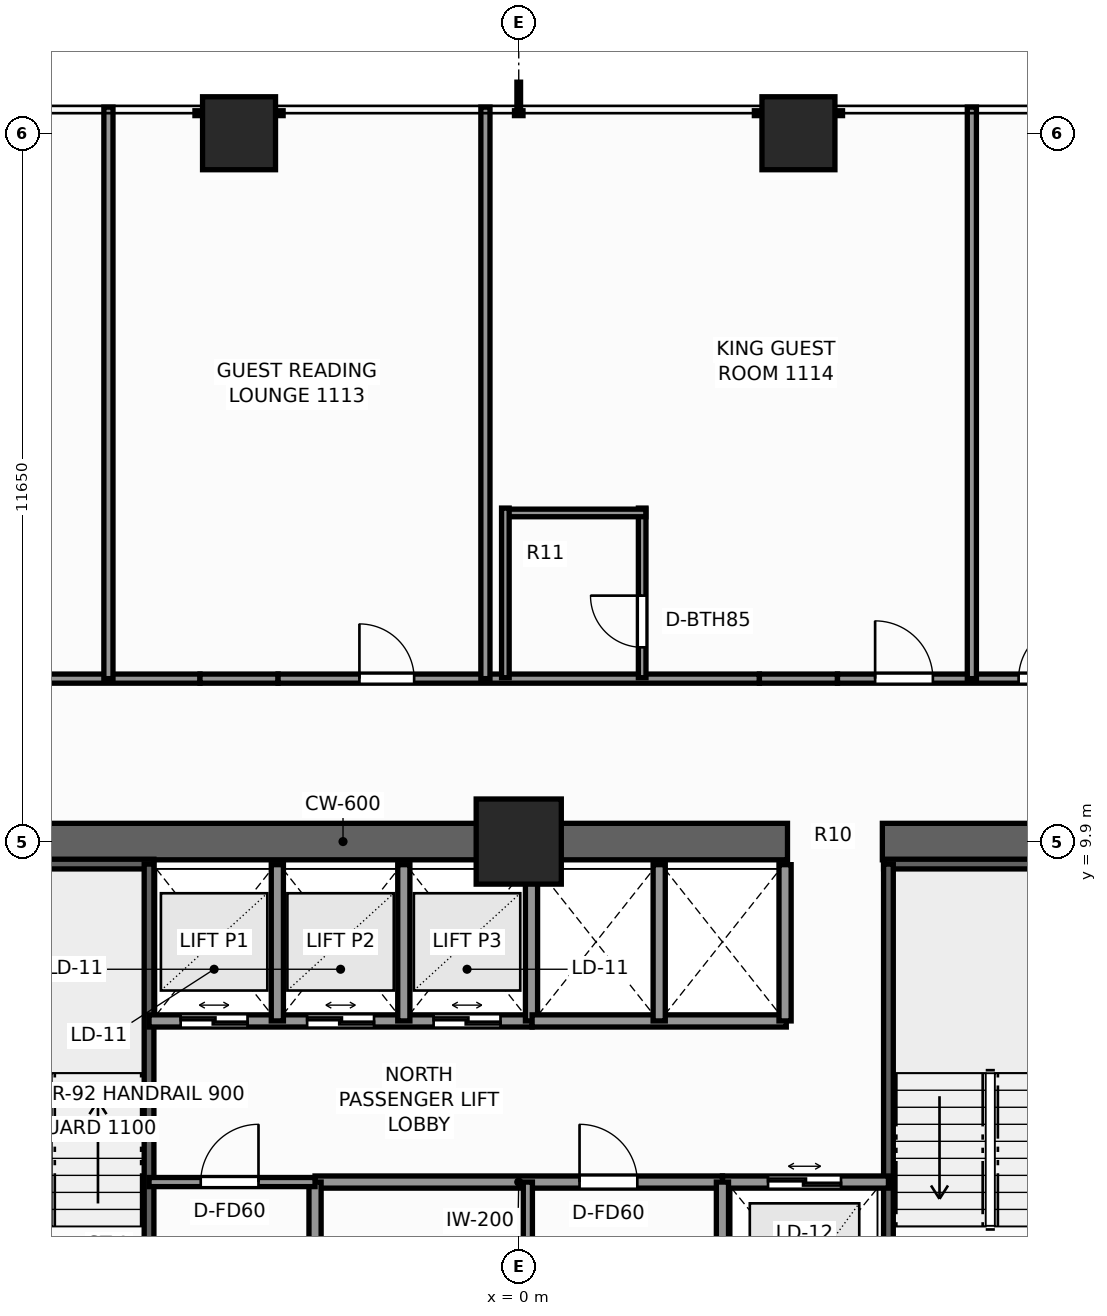
"""IFC4 building model, lengths in metres.
Left out: names, types, materials, properties, quantities, classifications, styles, units other than length and angle.
Written with IfcOpenShell. Run it as: python <this file> out.ifc"""

import sys

from ifc_helpers import new_model, si_unit, direction, frame, frame_2d, origin, origin_2d, place, context, subcontext, project, spatial, rectangle, extrude, element, fill, save


model = new_model("IFC4")
c1 = context("Model", 3, precision=1e-05, world=origin(), true_north=direction((0.0, 1.0)))
c2 = subcontext(c1, "Body", "Model", "MODEL_VIEW")
j1 = project(units=[si_unit("LENGTHUNIT", "METRE"), si_unit("PLANEANGLEUNIT", "RADIAN")], contexts=[c1])
p1 = place(None, origin())
s1 = spatial("IfcSite", under=j1, at=p1, CompositionType="ELEMENT")
p2 = place(p1, origin())
s2 = spatial("IfcBuilding", under=s1, at=p2, CompositionType="ELEMENT")
p3 = place(p2, frame((0.0, 0.0, 40.3)))
s3 = spatial("IfcBuildingStorey", under=s2, at=p3, CompositionType="ELEMENT", Elevation=40.3)
p4 = place(p3, frame((-10.2, 9.9, 0.0), z_axis=(0.0, 0.0, 1.0), x_axis=(1.0, 0.0, 0.0)))
e1 = element("IfcWall", 1, at=p4, inside=s3, PredefinedType="SHEAR", context=c2, shape_type="SweptSolid", body=[
    extrude(rectangle(XDim=14.62, YDim=0.6, at=frame_2d((7.31, 0.0))), origin(), (0.0, 0.0, 1.0), 3.3),
])
p5 = place(p3, frame((5.98, 9.9, 0.0), z_axis=(0.0, 0.0, 1.0), x_axis=(1.0, 0.0, 0.0)))
e2 = element("IfcWall", 2, at=p5, inside=s3, PredefinedType="SHEAR", context=c2, shape_type="SweptSolid", body=[
    extrude(rectangle(XDim=4.22, YDim=0.6, at=frame_2d((2.11, 0.0))), origin(), (0.0, 0.0, 1.0), 3.3),
])
p6 = place(p3, frame((0.0, 9.9, 0.0), z_axis=(0.0, 0.0, 1.0), x_axis=(1.0, 0.0, 0.0)))
e3 = element("IfcColumn", 3, at=p6, inside=s3, PredefinedType="COLUMN", context=c2, shape_type="SweptSolid", body=[
    extrude(rectangle(XDim=1.4, YDim=1.4, at=origin_2d()), origin(), (0.0, 0.0, 1.0), 3.3),
])
for number, where, z_axis, x_axis in (
    (4, (-4.6, 21.55, 0.0), (0.0, 0.0, 1.0), (1.0, 0.0, 0.0)),
    (5, (4.6, 21.55, 0.0), (0.0, 0.0, 1.0), (1.0, 0.0, 0.0)),
):
    element("IfcColumn", number, at=place(p3, frame(where, z_axis=z_axis, x_axis=x_axis)), inside=s3, PredefinedType="COLUMN", context=c2, shape_type="SweptSolid", body=[
        extrude(rectangle(XDim=1.2, YDim=1.2, at=origin_2d()), origin(), (0.0, 0.0, 1.0), 3.3),
    ])
p7 = place(p3, frame((-9.52, 9.53, 0.0), z_axis=(0.0, 0.0, 1.0), x_axis=(1.0, 0.0, 0.0)))
e6 = element("IfcWall", 6, at=p7, inside=s3, PredefinedType="SHEAR", context=c2, shape_type="SweptSolid", body=[
    extrude(rectangle(XDim=3.52, YDim=0.16, at=frame_2d((1.76, 0.0))), origin(), (0.0, 0.0, 1.0), 3.3),
])
p8 = place(p3, frame((-6.08, 1.97, 0.0), z_axis=(0.0, 0.0, 1.0), x_axis=(0.0, 1.0, 0.0)))
e7 = element("IfcWall", 7, at=p8, inside=s3, PredefinedType="SHEAR", context=c2, shape_type="SweptSolid", body=[
    extrude(rectangle(XDim=7.56, YDim=0.16, at=frame_2d((3.78, 0.0))), origin(), (0.0, 0.0, 1.0), 3.3),
])
p9 = place(p3, frame((6.0, 9.53, 0.0), z_axis=(0.0, 0.0, 1.0), x_axis=(1.0, 0.0, 0.0)))
e8 = element("IfcWall", 8, at=p9, inside=s3, PredefinedType="SHEAR", context=c2, shape_type="SweptSolid", body=[
    extrude(rectangle(XDim=3.52, YDim=0.16, at=frame_2d((1.76, 0.0))), origin(), (0.0, 0.0, 1.0), 3.3),
])
p10 = place(p3, frame((6.08, 1.97, 0.0), z_axis=(0.0, 0.0, 1.0), x_axis=(0.0, 1.0, 0.0)))
e9 = element("IfcWall", 9, at=p10, inside=s3, PredefinedType="SHEAR", context=c2, shape_type="SweptSolid", body=[
    extrude(rectangle(XDim=7.56, YDim=0.16, at=frame_2d((3.78, 0.0))), origin(), (0.0, 0.0, 1.0), 3.3),
])
p11 = place(p3, frame((3.35, 4.3, 0.0), z_axis=(0.0, 0.0, 1.0), x_axis=(1.0, 0.0, 0.0)))
e10 = element("IfcWall", 10, at=p11, inside=s3, PredefinedType="SOLIDWALL", context=c2, shape_type="SweptSolid", body=[
    extrude(rectangle(XDim=2.73, YDim=0.2, at=frame_2d((1.365, 0.0))), origin(), (0.0, 0.0, 1.0), 3.06),
])
p12 = place(p11, frame((0.75, 0.0, 0.0)))
e11 = element("IfcOpeningElement", 11, at=p12, cuts=e10, PredefinedType="OPENING", context=c2, shape_type="SweptSolid", body=[
    extrude(rectangle(XDim=1.2, YDim=2.25, at=frame_2d((0.6, 1.125))), frame((0.0, 0.11, 0.0), z_axis=(0.0, -1.0, 0.0), x_axis=(1.0, 0.0, 0.0)), (0.0, 0.0, 1.0), 0.22),
])
p13 = place(p3, frame((-6.08, 6.95, 0.0), z_axis=(0.0, 0.0, 1.0), x_axis=(1.0, 0.0, 0.0)))
e12 = element("IfcWall", 12, at=p13, inside=s3, PredefinedType="SOLIDWALL", context=c2, shape_type="SweptSolid", body=[
    extrude(rectangle(XDim=6.3, YDim=0.2, at=frame_2d((3.15, 0.0))), origin(), (0.0, 0.0, 1.0), 3.06),
])
p14 = place(p13, frame((0.52, 0.0, 0.0)))
e13 = element("IfcOpeningElement", 13, at=p14, cuts=e12, PredefinedType="OPENING", context=c2, shape_type="SweptSolid", body=[
    extrude(rectangle(XDim=1.1, YDim=2.2, at=frame_2d((0.55, 1.1))), frame((0.0, 0.11, 0.0), z_axis=(0.0, -1.0, 0.0), x_axis=(1.0, 0.0, 0.0)), (0.0, 0.0, 1.0), 0.22),
])
p15 = place(p13, frame((2.6, 0.0, 0.0)))
e14 = element("IfcOpeningElement", 14, at=p15, cuts=e12, PredefinedType="OPENING", context=c2, shape_type="SweptSolid", body=[
    extrude(rectangle(XDim=1.1, YDim=2.2, at=frame_2d((0.55, 1.1))), frame((0.0, 0.11, 0.0), z_axis=(0.0, -1.0, 0.0), x_axis=(1.0, 0.0, 0.0)), (0.0, 0.0, 1.0), 0.22),
])
p16 = place(p13, frame((4.68, 0.0, 0.0)))
e15 = element("IfcOpeningElement", 15, at=p16, cuts=e12, PredefinedType="OPENING", context=c2, shape_type="SweptSolid", body=[
    extrude(rectangle(XDim=1.1, YDim=2.2, at=frame_2d((0.55, 1.1))), frame((0.0, 0.11, 0.0), z_axis=(0.0, -1.0, 0.0), x_axis=(1.0, 0.0, 0.0)), (0.0, 0.0, 1.0), 0.22),
])
for number, where, z_axis, x_axis in (
    (16, (-3.97, 6.95, 0.0), (0.0, 0.0, 1.0), (0.0, 1.0, 0.0)),
    (17, (-1.89, 6.95, 0.0), (0.0, 0.0, 1.0), (0.0, 1.0, 0.0)),
    (18, (0.21, 6.95, 0.0), (0.0, 0.0, 1.0), (0.0, 1.0, 0.0)),
):
    element("IfcWall", number, at=place(p3, frame(where, z_axis=z_axis, x_axis=x_axis)), inside=s3, PredefinedType="SOLIDWALL", context=c2, shape_type="SweptSolid", body=[
        extrude(rectangle(XDim=2.57, YDim=0.2, at=frame_2d((1.285, 0.0))), origin(), (0.0, 0.0, 1.0), 3.06),
    ])
p17 = place(p3, frame((0.22, 6.95, 0.0), z_axis=(0.0, 0.0, 1.0), x_axis=(1.0, 0.0, 0.0)))
e19 = element("IfcWall", 19, at=p17, inside=s3, PredefinedType="SOLIDWALL", context=c2, shape_type="SweptSolid", body=[
    extrude(rectangle(XDim=4.18, YDim=0.2, at=frame_2d((2.09, 0.0))), origin(), (0.0, 0.0, 1.0), 3.06),
])
for number, where, z_axis, x_axis in (
    (20, (4.38, 6.95, 0.0), (0.0, 0.0, 1.0), (0.0, 1.0, 0.0)),
    (21, (2.31, 6.95, 0.0), (0.0, 0.0, 1.0), (0.0, 1.0, 0.0)),
):
    element("IfcWall", number, at=place(p3, frame(where, z_axis=z_axis, x_axis=x_axis)), inside=s3, PredefinedType="SOLIDWALL", context=c2, shape_type="SweptSolid", body=[
        extrude(rectangle(XDim=2.57, YDim=0.2, at=frame_2d((1.285, 0.0))), origin(), (0.0, 0.0, 1.0), 3.06),
    ])
p18 = place(p3, frame((-3.35, 4.3, 0.0), z_axis=(0.0, 0.0, 1.0), x_axis=(1.0, 0.0, 0.0)))
e22 = element("IfcWall", 22, at=p18, inside=s3, PredefinedType="SOLIDWALL", context=c2, shape_type="SweptSolid", body=[
    extrude(rectangle(XDim=6.7, YDim=0.2, at=frame_2d((3.35, 0.0))), origin(), (0.0, 0.0, 1.0), 3.06),
])
p19 = place(p18, frame((4.35, 0.0, 0.0)))
e23 = element("IfcOpeningElement", 23, at=p19, cuts=e22, PredefinedType="OPENING", context=c2, shape_type="SweptSolid", body=[
    extrude(rectangle(XDim=0.95, YDim=2.06, at=frame_2d((0.475, 1.03))), frame((0.0, 0.11, 0.0), z_axis=(0.0, -1.0, 0.0), x_axis=(1.0, 0.0, 0.0)), (0.0, 0.0, 1.0), 0.22),
])
for number, where, z_axis, x_axis in (
    (24, (-3.35, 1.1, 0.0), (0.0, 0.0, 1.0), (0.0, 1.0, 0.0)),
    (25, (3.35, 1.1, 0.0), (0.0, 0.0, 1.0), (0.0, 1.0, 0.0)),
):
    element("IfcWall", number, at=place(p3, frame(where, z_axis=z_axis, x_axis=x_axis)), inside=s3, PredefinedType="SOLIDWALL", context=c2, shape_type="SweptSolid", body=[
        extrude(rectangle(XDim=3.2, YDim=0.2, at=frame_2d((1.6, 0.0))), origin(), (0.0, 0.0, 1.0), 3.06),
    ])
p20 = place(p3, frame((0.15, -1.7, 0.0), z_axis=(0.0, 0.0, 1.0), x_axis=(0.0, 1.0, 0.0)))
e26 = element("IfcWall", 26, at=p20, inside=s3, PredefinedType="PARTITIONING", context=c2, shape_type="SweptSolid", body=[
    extrude(rectangle(XDim=6.0, YDim=0.15, at=frame_2d((3.0, 0.0))), origin(), (0.0, 0.0, 1.0), 3.06),
])
p21 = place(p20, frame((3.6, 0.0, 0.0)))
e27 = element("IfcOpeningElement", 27, at=p21, cuts=e26, PredefinedType="OPENING", context=c2, shape_type="SweptSolid", body=[
    extrude(rectangle(XDim=0.85, YDim=2.03, at=frame_2d((0.425, 1.015))), frame((0.0, 0.085, 0.0), z_axis=(0.0, -1.0, 0.0), x_axis=(1.0, 0.0, 0.0)), (0.0, 0.0, 1.0), 0.17),
])
p22 = place(p3, frame((-6.08, 4.3, 0.0), z_axis=(0.0, 0.0, 1.0), x_axis=(1.0, 0.0, 0.0)))
e28 = element("IfcWall", 28, at=p22, inside=s3, PredefinedType="PARTITIONING", context=c2, shape_type="SweptSolid", body=[
    extrude(rectangle(XDim=2.73, YDim=0.15, at=frame_2d((1.365, 0.0))), origin(), (0.0, 0.0, 1.0), 3.06),
])
p23 = place(p22, frame((0.85, 0.0, 0.0)))
e29 = element("IfcOpeningElement", 29, at=p23, cuts=e28, PredefinedType="OPENING", context=c2, shape_type="SweptSolid", body=[
    extrude(rectangle(XDim=0.95, YDim=2.06, at=frame_2d((0.475, 1.03))), frame((0.0, 0.085, 0.0), z_axis=(0.0, -1.0, 0.0), x_axis=(1.0, 0.0, 0.0)), (0.0, 0.0, 1.0), 0.17),
])
p24 = place(p3, frame((-10.216, 12.58, 0.0), z_axis=(0.0, 0.0, 1.0), x_axis=(1.0, 0.0, 0.0)))
e30 = element("IfcWall", 30, at=p24, inside=s3, PredefinedType="PARTITIONING", context=c2, shape_type="SweptSolid", body=[
    extrude(rectangle(XDim=4.974, YDim=0.15, at=frame_2d((2.487, 0.0))), origin(), (0.0, 0.0, 1.0), 3.06),
])
p25 = place(p24, frame((1.535, 0.0, 0.0)))
e31 = element("IfcOpeningElement", 31, at=p25, cuts=e30, PredefinedType="OPENING", context=c2, shape_type="SweptSolid", body=[
    extrude(rectangle(XDim=0.9, YDim=2.06, at=frame_2d((0.45, 1.03))), frame((0.0, 0.085, 0.0), z_axis=(0.0, -1.0, 0.0), x_axis=(1.0, 0.0, 0.0)), (0.0, 0.0, 1.0), 0.17),
])
p26 = place(p3, frame((-5.242, 12.58, 0.0), z_axis=(0.0, 0.0, 1.0), x_axis=(1.0, 0.0, 0.0)))
e32 = element("IfcWall", 32, at=p26, inside=s3, PredefinedType="PARTITIONING", context=c2, shape_type="SweptSolid", body=[
    extrude(rectangle(XDim=1.284, YDim=0.15, at=frame_2d((0.642, 0.0))), origin(), (0.0, 0.0, 1.0), 1.245),
])
p27 = place(p3, frame((-3.958, 12.58, 0.0), z_axis=(0.0, 0.0, 1.0), x_axis=(1.0, 0.0, 0.0)))
e33 = element("IfcWall", 33, at=p27, inside=s3, PredefinedType="PARTITIONING", context=c2, shape_type="SweptSolid", body=[
    extrude(rectangle(XDim=7.916, YDim=0.15, at=frame_2d((3.958, 0.0))), origin(), (0.0, 0.0, 1.0), 2.349),
])
p28 = place(p27, frame((1.338, 0.0, 0.0)))
e34 = element("IfcOpeningElement", 34, at=p28, cuts=e33, PredefinedType="OPENING", context=c2, shape_type="SweptSolid", body=[
    extrude(rectangle(XDim=0.9, YDim=2.06, at=frame_2d((0.45, 1.03))), frame((0.0, 0.085, 0.0), z_axis=(0.0, -1.0, 0.0), x_axis=(1.0, 0.0, 0.0)), (0.0, 0.0, 1.0), 0.17),
])
p29 = place(p3, frame((3.958, 12.58, 0.0), z_axis=(0.0, 0.0, 1.0), x_axis=(1.0, 0.0, 0.0)))
e35 = element("IfcWall", 35, at=p29, inside=s3, PredefinedType="PARTITIONING", context=c2, shape_type="SweptSolid", body=[
    extrude(rectangle(XDim=1.284, YDim=0.15, at=frame_2d((0.642, 0.0))), origin(), (0.0, 0.0, 1.0), 1.245),
])
p30 = place(p3, frame((5.242, 12.58, 0.0), z_axis=(0.0, 0.0, 1.0), x_axis=(1.0, 0.0, 0.0)))
e36 = element("IfcWall", 36, at=p30, inside=s3, PredefinedType="PARTITIONING", context=c2, shape_type="SweptSolid", body=[
    extrude(rectangle(XDim=4.974, YDim=0.15, at=frame_2d((2.487, 0.0))), origin(), (0.0, 0.0, 1.0), 3.06),
])
p31 = place(p30, frame((0.619, 0.0, 0.0)))
e37 = element("IfcOpeningElement", 37, at=p31, cuts=e36, PredefinedType="OPENING", context=c2, shape_type="SweptSolid", body=[
    extrude(rectangle(XDim=0.95, YDim=2.06, at=frame_2d((0.475, 1.03))), frame((0.0, 0.085, 0.0), z_axis=(0.0, -1.0, 0.0), x_axis=(1.0, 0.0, 0.0)), (0.0, 0.0, 1.0), 0.17),
])
p32 = place(p30, frame((2.979, 0.0, 0.0)))
e38 = element("IfcOpeningElement", 38, at=p32, cuts=e36, PredefinedType="OPENING", context=c2, shape_type="SweptSolid", body=[
    extrude(rectangle(XDim=0.9, YDim=2.06, at=frame_2d((0.45, 1.03))), frame((0.0, 0.085, 0.0), z_axis=(0.0, -1.0, 0.0), x_axis=(1.0, 0.0, 0.0)), (0.0, 0.0, 1.0), 0.17),
])
for number, where, z_axis, x_axis in (
    (39, (-6.748, 12.58, 0.0), (0.0, 0.0, 1.0), (0.0, 1.0, 0.0)),
    (40, (-0.548, 12.58, 0.0), (0.0, 0.0, 1.0), (0.0, 1.0, 0.0)),
    (41, (7.452, 12.58, 0.0), (0.0, 0.0, 1.0), (0.0, 1.0, 0.0)),
):
    element("IfcWall", number, at=place(p3, frame(where, z_axis=z_axis, x_axis=x_axis)), inside=s3, PredefinedType="PARTITIONING", context=c2, shape_type="SweptSolid", body=[
        extrude(rectangle(XDim=9.4, YDim=0.15, at=frame_2d((4.7, 0.0))), origin(), (0.0, 0.0, 1.0), 2.429),
    ])
p33 = place(p3, frame((2.03, 12.595, 0.0), z_axis=(0.0, 0.0, 1.0), x_axis=(0.0, 1.0, 0.0)))
e42 = element("IfcWall", 42, at=p33, inside=s3, PredefinedType="PARTITIONING", context=c2, shape_type="SweptSolid", body=[
    extrude(rectangle(XDim=2.79, YDim=0.125, at=frame_2d((1.395, 0.0))), origin(), (0.0, 0.0, 1.0), 3.06),
])
p34 = place(p33, frame((0.5, 0.0, 0.0)))
e43 = element("IfcOpeningElement", 43, at=p34, cuts=e42, PredefinedType="OPENING", context=c2, shape_type="SweptSolid", body=[
    extrude(rectangle(XDim=0.85, YDim=2.03, at=frame_2d((0.425, 1.015))), frame((0.0, 0.073, 0.0), z_axis=(0.0, -1.0, 0.0), x_axis=(1.0, 0.0, 0.0)), (0.0, 0.0, 1.0), 0.145),
])
p35 = place(p3, frame((-0.28, 15.305, 0.0), z_axis=(0.0, 0.0, 1.0), x_axis=(1.0, 0.0, 0.0)))
e44 = element("IfcWall", 44, at=p35, inside=s3, PredefinedType="PARTITIONING", context=c2, shape_type="SweptSolid", body=[
    extrude(rectangle(XDim=2.37, YDim=0.125, at=frame_2d((1.185, 0.0))), origin(), (0.0, 0.0, 1.0), 2.585),
])
p36 = place(p3, frame((-0.22, 12.595, 0.0), z_axis=(0.0, 0.0, 1.0), x_axis=(0.0, 1.0, 0.0)))
e45 = element("IfcWall", 45, at=p36, inside=s3, PredefinedType="PARTITIONING", context=c2, shape_type="SweptSolid", body=[
    extrude(rectangle(XDim=2.79, YDim=0.125, at=frame_2d((1.395, 0.0))), origin(), (0.0, 0.0, 1.0), 3.06),
])
p37 = place(p12, origin())
e46 = element("IfcDoor", 46, at=p37, inside=s3, OperationType="DOUBLE_DOOR_SLIDING", PredefinedType="DOOR", context=c2, shape_type="SweptSolid", body=[
    extrude(rectangle(XDim=1.2, YDim=2.25, at=frame_2d((0.6, 1.125))), frame((0.0, 0.025, 0.0), z_axis=(0.0, -1.0, 0.0), x_axis=(1.0, 0.0, 0.0)), (0.0, 0.0, 1.0), 0.05),
])
fill(e11, e46)
p38 = place(p14, origin())
e47 = element("IfcDoor", 47, at=p38, inside=s3, OperationType="DOUBLE_DOOR_SLIDING", PredefinedType="DOOR", context=c2, shape_type="SweptSolid", body=[
    extrude(rectangle(XDim=1.1, YDim=2.2, at=frame_2d((0.55, 1.1))), frame((0.0, 0.025, 0.0), z_axis=(0.0, -1.0, 0.0), x_axis=(1.0, 0.0, 0.0)), (0.0, 0.0, 1.0), 0.05),
])
fill(e13, e47)
p39 = place(p15, origin())
e48 = element("IfcDoor", 48, at=p39, inside=s3, OperationType="DOUBLE_DOOR_SLIDING", PredefinedType="DOOR", context=c2, shape_type="SweptSolid", body=[
    extrude(rectangle(XDim=1.1, YDim=2.2, at=frame_2d((0.55, 1.1))), frame((0.0, 0.025, 0.0), z_axis=(0.0, -1.0, 0.0), x_axis=(1.0, 0.0, 0.0)), (0.0, 0.0, 1.0), 0.05),
])
fill(e14, e48)
p40 = place(p16, origin())
e49 = element("IfcDoor", 49, at=p40, inside=s3, OperationType="DOUBLE_DOOR_SLIDING", PredefinedType="DOOR", context=c2, shape_type="SweptSolid", body=[
    extrude(rectangle(XDim=1.1, YDim=2.2, at=frame_2d((0.55, 1.1))), frame((0.0, 0.025, 0.0), z_axis=(0.0, -1.0, 0.0), x_axis=(1.0, 0.0, 0.0)), (0.0, 0.0, 1.0), 0.05),
])
fill(e15, e49)
p41 = place(p19, origin())
e50 = element("IfcDoor", 50, at=p41, inside=s3, OperationType="SINGLE_SWING_LEFT", PredefinedType="DOOR", context=c2, shape_type="SweptSolid", body=[
    extrude(rectangle(XDim=0.95, YDim=2.06, at=frame_2d((0.475, 1.03))), frame((0.0, 0.025, 0.0), z_axis=(0.0, -1.0, 0.0), x_axis=(1.0, 0.0, 0.0)), (0.0, 0.0, 1.0), 0.05),
])
fill(e23, e50)
p42 = place(p23, origin())
e51 = element("IfcDoor", 51, at=p42, inside=s3, OperationType="SINGLE_SWING_RIGHT", PredefinedType="DOOR", context=c2, shape_type="SweptSolid", body=[
    extrude(rectangle(XDim=0.95, YDim=2.06, at=frame_2d((0.475, 1.03))), frame((0.0, 0.025, 0.0), z_axis=(0.0, -1.0, 0.0), x_axis=(1.0, 0.0, 0.0)), (0.0, 0.0, 1.0), 0.05),
])
fill(e29, e51)
p43 = place(p28, origin())
e52 = element("IfcDoor", 52, at=p43, inside=s3, OperationType="SINGLE_SWING_LEFT", PredefinedType="DOOR", context=c2, shape_type="SweptSolid", body=[
    extrude(rectangle(XDim=0.9, YDim=2.06, at=frame_2d((0.45, 1.03))), frame((0.0, 0.025, 0.0), z_axis=(0.0, -1.0, 0.0), x_axis=(1.0, 0.0, 0.0)), (0.0, 0.0, 1.0), 0.05),
])
fill(e34, e52)
p44 = place(p34, origin())
e53 = element("IfcDoor", 53, at=p44, inside=s3, OperationType="SINGLE_SWING_RIGHT", PredefinedType="DOOR", context=c2, shape_type="SweptSolid", body=[
    extrude(rectangle(XDim=0.85, YDim=2.03, at=frame_2d((0.425, 1.015))), frame((0.0, 0.025, 0.0), z_axis=(0.0, -1.0, 0.0), x_axis=(1.0, 0.0, 0.0)), (0.0, 0.0, 1.0), 0.05),
])
fill(e43, e53)
p45 = place(p31, origin())
e54 = element("IfcDoor", 54, at=p45, inside=s3, OperationType="SINGLE_SWING_LEFT", PredefinedType="DOOR", context=c2, shape_type="SweptSolid", body=[
    extrude(rectangle(XDim=0.95, YDim=2.06, at=frame_2d((0.475, 1.03))), frame((0.0, 0.025, 0.0), z_axis=(0.0, -1.0, 0.0), x_axis=(1.0, 0.0, 0.0)), (0.0, 0.0, 1.0), 0.05),
])
fill(e37, e54)
p46 = place(p32, origin())
e55 = element("IfcDoor", 55, at=p46, inside=s3, OperationType="SINGLE_SWING_RIGHT", PredefinedType="DOOR", context=c2, shape_type="SweptSolid", body=[
    extrude(rectangle(XDim=0.9, YDim=2.06, at=frame_2d((0.45, 1.03))), frame((0.0, 0.025, 0.0), z_axis=(0.0, -1.0, 0.0), x_axis=(1.0, 0.0, 0.0)), (0.0, 0.0, 1.0), 0.05),
])
fill(e38, e55)
save(model, sys.argv[1])
